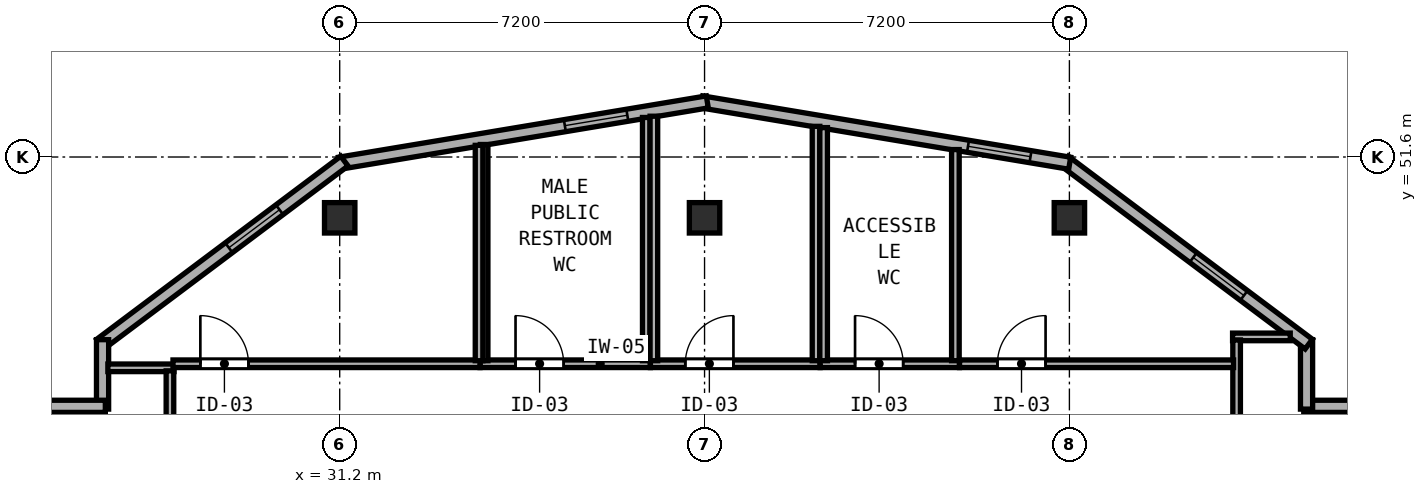
"""IFC4 building model, lengths in metres.
Left out: names, types, materials, properties, quantities, classifications, styles, units other than length and angle.
Written with IfcOpenShell. Run it as: python <this file> out.ifc"""

import sys

from ifc_helpers import new_model, si_unit, direction, frame, frame_2d, origin, origin_2d, place, context, subcontext, project, spatial, rectangle, hollow_rectangle, extrude, element, fill, save


model = new_model("IFC4")
c1 = context("Model", 3, precision=1e-05, world=origin(), true_north=direction((0.0, 1.0)))
c2 = subcontext(c1, "Body", "Model", "MODEL_VIEW")
j1 = project(units=[si_unit("LENGTHUNIT", "METRE"), si_unit("PLANEANGLEUNIT", "RADIAN")], contexts=[c1])
p1 = place(None, origin())
s1 = spatial("IfcSite", under=j1, at=p1, CompositionType="ELEMENT")
p2 = place(p1, origin())
s2 = spatial("IfcBuilding", under=s1, at=p2, CompositionType="ELEMENT")
p3 = place(p2, frame((0.0, 0.0, 313.4)))
s3 = spatial("IfcBuildingStorey", under=s2, at=p3, CompositionType="ELEMENT", Elevation=313.4)
for number, where, z_axis, x_axis in (
    (1, (31.2, 50.4, 0.0), (0.0, 0.0, 1.0), (1.0, 0.0, 0.0)),
    (2, (45.6, 50.4, 0.0), (0.0, 0.0, 1.0), (1.0, 0.0, 0.0)),
    (3, (38.4, 50.4, 0.0), (0.0, 0.0, 1.0), (1.0, 0.0, 0.0)),
):
    element("IfcColumn", number, at=place(p3, frame(where, z_axis=z_axis, x_axis=x_axis)), inside=s3, PredefinedType="COLUMN", context=c2, shape_type="SweptSolid", body=[
        extrude(hollow_rectangle(XDim=0.6, YDim=0.6, WallThickness=0.024, at=origin_2d()), origin(), (0.0, 0.0, 1.0), 4.8),
    ])
p4 = place(p3, frame((51.535, 46.68, 0.0), z_axis=(0.0, 0.0, 1.0), x_axis=(-1.0, 0.0, 0.0)))
e4 = element("IfcWall", 4, at=p4, inside=s3, PredefinedType="SOLIDWALL", context=c2, shape_type="SweptSolid", body=[
    extrude(rectangle(XDim=1.31, YDim=0.24, at=frame_2d((0.655, 0.0))), origin(), (0.0, 0.0, 1.0), 4.56),
])
p5 = place(p3, frame((50.28, 46.625, 0.0), z_axis=(0.0, 0.0, 1.0), x_axis=(0.0, 1.0, 0.0)))
e5 = element("IfcWall", 5, at=p5, inside=s3, PredefinedType="SOLIDWALL", context=c2, shape_type="SweptSolid", body=[
    extrude(rectangle(XDim=1.37, YDim=0.24, at=frame_2d((0.685, 0.0))), origin(), (0.0, 0.0, 1.0), 4.56),
])
p6 = place(p3, frame((50.324, 47.907, 0.0), z_axis=(0.0, 0.0, 1.0), x_axis=(-0.80001459783, 0.599980535734, 0.0)))
e6 = element("IfcWall", 6, at=p6, inside=s3, PredefinedType="SOLIDWALL", context=c2, shape_type="SweptSolid", body=[
    extrude(rectangle(XDim=6.021, YDim=0.24, at=frame_2d((3.01, 0.0))), origin(), (0.0, 0.0, 1.0), 4.56),
])
p7 = place(p6, frame((1.6, 0.0, 0.85)))
e7 = element("IfcOpeningElement", 7, at=p7, cuts=e6, PredefinedType="OPENING", context=c2, shape_type="SweptSolid", body=[
    extrude(rectangle(XDim=1.25, YDim=1.95, at=frame_2d((0.625, 0.975))), frame((0.0, 0.13, 0.0), z_axis=(0.0, -1.0, 0.0), x_axis=(1.0, 0.0, 0.0)), (0.0, 0.0, 1.0), 0.26),
])
p8 = place(p3, frame((45.606, 51.477, 0.0), z_axis=(0.0, 0.0, 1.0), x_axis=(-0.986394820321, 0.164393608283, 0.0)))
e8 = element("IfcWall", 8, at=p8, inside=s3, PredefinedType="SOLIDWALL", context=c2, shape_type="SweptSolid", body=[
    extrude(rectangle(XDim=7.36, YDim=0.24, at=frame_2d((3.68, 0.0))), origin(), (0.0, 0.0, 1.0), 4.56),
])
p9 = place(p8, frame((0.784, 0.0, 0.85)))
e9 = element("IfcOpeningElement", 9, at=p9, cuts=e8, PredefinedType="OPENING", context=c2, shape_type="SweptSolid", body=[
    extrude(rectangle(XDim=1.25, YDim=1.95, at=frame_2d((0.625, 0.975))), frame((0.0, 0.13, 0.0), z_axis=(0.0, -1.0, 0.0), x_axis=(1.0, 0.0, 0.0)), (0.0, 0.0, 1.0), 0.26),
])
p10 = place(p3, frame((38.454, 52.687, 0.0), z_axis=(0.0, 0.0, 1.0), x_axis=(-0.986394820321, -0.164393608283, 0.0)))
e10 = element("IfcWall", 10, at=p10, inside=s3, PredefinedType="SOLIDWALL", context=c2, shape_type="SweptSolid", body=[
    extrude(rectangle(XDim=7.36, YDim=0.24, at=frame_2d((3.68, 0.0))), origin(), (0.0, 0.0, 1.0), 4.56),
])
p11 = place(p10, frame((1.6, 0.0, 0.85)))
e11 = element("IfcOpeningElement", 11, at=p11, cuts=e10, PredefinedType="OPENING", context=c2, shape_type="SweptSolid", body=[
    extrude(rectangle(XDim=1.25, YDim=1.95, at=frame_2d((0.625, 0.975))), frame((0.0, 0.13, 0.0), z_axis=(0.0, -1.0, 0.0), x_axis=(1.0, 0.0, 0.0)), (0.0, 0.0, 1.0), 0.26),
])
p12 = place(p3, frame((31.292, 51.519, 0.0), z_axis=(0.0, 0.0, 1.0), x_axis=(-0.8, -0.6, 0.0)))
e12 = element("IfcWall", 12, at=p12, inside=s3, PredefinedType="SOLIDWALL", context=c2, shape_type="SweptSolid", body=[
    extrude(rectangle(XDim=6.021, YDim=0.24, at=frame_2d((3.01, 0.0))), origin(), (0.0, 0.0, 1.0), 4.56),
])
p13 = place(p12, frame((1.6, 0.0, 0.85)))
e13 = element("IfcOpeningElement", 13, at=p13, cuts=e12, PredefinedType="OPENING", context=c2, shape_type="SweptSolid", body=[
    extrude(rectangle(XDim=1.25, YDim=1.95, at=frame_2d((0.625, 0.975))), frame((0.0, 0.13, 0.0), z_axis=(0.0, -1.0, 0.0), x_axis=(1.0, 0.0, 0.0)), (0.0, 0.0, 1.0), 0.26),
])
p14 = place(p3, frame((26.52, 47.995, 0.0), z_axis=(0.0, 0.0, 1.0), x_axis=(0.0, -1.0, 0.0)))
e14 = element("IfcWall", 14, at=p14, inside=s3, PredefinedType="SOLIDWALL", context=c2, shape_type="SweptSolid", body=[
    extrude(rectangle(XDim=1.37, YDim=0.24, at=frame_2d((0.685, 0.0))), origin(), (0.0, 0.0, 1.0), 4.56),
])
p15 = place(p3, frame((26.575, 46.68, 0.0), z_axis=(0.0, 0.0, 1.0), x_axis=(-1.0, 0.0, 0.0)))
e15 = element("IfcWall", 15, at=p15, inside=s3, PredefinedType="SOLIDWALL", context=c2, shape_type="SweptSolid", body=[
    extrude(rectangle(XDim=1.31, YDim=0.24, at=frame_2d((0.655, 0.0))), origin(), (0.0, 0.0, 1.0), 4.56),
])
p16 = place(p3, frame((33.97, 47.52, 0.0), z_axis=(0.0, 0.0, 1.0), x_axis=(1.0, 0.0, 0.0)))
e16 = element("IfcWall", 16, at=p16, inside=s3, PredefinedType="PARTITIONING", context=c2, shape_type="SweptSolid", body=[
    extrude(rectangle(XDim=3.36, YDim=0.15, at=frame_2d((1.68, 0.0))), origin(), (0.0, 0.0, 1.0), 4.56),
])
p17 = place(p16, frame((0.7, 0.0, 0.0)))
e17 = element("IfcOpeningElement", 17, at=p17, cuts=e16, PredefinedType="OPENING", context=c2, shape_type="SweptSolid", body=[
    extrude(rectangle(XDim=0.95, YDim=2.12, at=frame_2d((0.475, 1.06))), frame((0.0, 0.085, 0.0), z_axis=(0.0, -1.0, 0.0), x_axis=(1.0, 0.0, 0.0)), (0.0, 0.0, 1.0), 0.17),
])
p18 = place(p3, frame((34.05, 47.58, 0.0), z_axis=(0.0, 0.0, 1.0), x_axis=(0.0, 1.0, 0.0)))
e18 = element("IfcWall", 18, at=p18, inside=s3, PredefinedType="PARTITIONING", context=c2, shape_type="SweptSolid", body=[
    extrude(rectangle(XDim=4.267, YDim=0.15, at=frame_2d((2.133, 0.0))), origin(), (0.0, 0.0, 1.0), 4.56),
])
p19 = place(p3, frame((37.25, 47.58, 0.0), z_axis=(0.0, 0.0, 1.0), x_axis=(0.0, 1.0, 0.0)))
e19 = element("IfcWall", 19, at=p19, inside=s3, PredefinedType="PARTITIONING", context=c2, shape_type="SweptSolid", body=[
    extrude(rectangle(XDim=4.8, YDim=0.15, at=frame_2d((2.4, 0.0))), origin(), (0.0, 0.0, 1.0), 4.56),
])
p20 = place(p3, frame((37.332, 47.52, 0.0), z_axis=(0.0, 0.0, 1.0), x_axis=(1.0, 0.0, 0.0)))
e20 = element("IfcWall", 20, at=p20, inside=s3, PredefinedType="PARTITIONING", context=c2, shape_type="SweptSolid", body=[
    extrude(rectangle(XDim=3.348, YDim=0.15, at=frame_2d((1.674, 0.0))), origin(), (0.0, 0.0, 1.0), 4.56),
])
p21 = place(p20, frame((0.688, 0.0, 0.0)))
e21 = element("IfcOpeningElement", 21, at=p21, cuts=e20, PredefinedType="OPENING", context=c2, shape_type="SweptSolid", body=[
    extrude(rectangle(XDim=0.95, YDim=2.12, at=frame_2d((0.475, 1.06))), frame((0.0, 0.085, 0.0), z_axis=(0.0, -1.0, 0.0), x_axis=(1.0, 0.0, 0.0)), (0.0, 0.0, 1.0), 0.17),
])
p22 = place(p3, frame((37.4, 47.58, 0.0), z_axis=(0.0, 0.0, 1.0), x_axis=(0.0, 1.0, 0.0)))
e22 = element("IfcWall", 22, at=p22, inside=s3, PredefinedType="PARTITIONING", context=c2, shape_type="SweptSolid", body=[
    extrude(rectangle(XDim=4.825, YDim=0.15, at=frame_2d((2.413, 0.0))), origin(), (0.0, 0.0, 1.0), 4.56),
])
p23 = place(p3, frame((40.6, 47.58, 0.0), z_axis=(0.0, 0.0, 1.0), x_axis=(0.0, 1.0, 0.0)))
e23 = element("IfcWall", 23, at=p23, inside=s3, PredefinedType="PARTITIONING", context=c2, shape_type="SweptSolid", body=[
    extrude(rectangle(XDim=4.625, YDim=0.15, at=frame_2d((2.312, 0.0))), origin(), (0.0, 0.0, 1.0), 4.56),
])
p24 = place(p3, frame((40.682, 47.52, 0.0), z_axis=(0.0, 0.0, 1.0), x_axis=(1.0, 0.0, 0.0)))
e24 = element("IfcWall", 24, at=p24, inside=s3, PredefinedType="PARTITIONING", context=c2, shape_type="SweptSolid", body=[
    extrude(rectangle(XDim=2.748, YDim=0.15, at=frame_2d((1.374, 0.0))), origin(), (0.0, 0.0, 1.0), 4.56),
])
p25 = place(p24, frame((0.688, 0.0, 0.0)))
e25 = element("IfcOpeningElement", 25, at=p25, cuts=e24, PredefinedType="OPENING", context=c2, shape_type="SweptSolid", body=[
    extrude(rectangle(XDim=0.95, YDim=2.12, at=frame_2d((0.475, 1.06))), frame((0.0, 0.085, 0.0), z_axis=(0.0, -1.0, 0.0), x_axis=(1.0, 0.0, 0.0)), (0.0, 0.0, 1.0), 0.17),
])
p26 = place(p3, frame((40.75, 47.58, 0.0), z_axis=(0.0, 0.0, 1.0), x_axis=(0.0, 1.0, 0.0)))
e26 = element("IfcWall", 26, at=p26, inside=s3, PredefinedType="PARTITIONING", context=c2, shape_type="SweptSolid", body=[
    extrude(rectangle(XDim=4.6, YDim=0.15, at=frame_2d((2.3, 0.0))), origin(), (0.0, 0.0, 1.0), 4.56),
])
p27 = place(p3, frame((43.35, 47.58, 0.0), z_axis=(0.0, 0.0, 1.0), x_axis=(0.0, 1.0, 0.0)))
e27 = element("IfcWall", 27, at=p27, inside=s3, PredefinedType="PARTITIONING", context=c2, shape_type="SweptSolid", body=[
    extrude(rectangle(XDim=4.167, YDim=0.15, at=frame_2d((2.083, 0.0))), origin(), (0.0, 0.0, 1.0), 4.56),
])
p28 = place(p3, frame((26.625, 47.44, 0.0), z_axis=(0.0, 0.0, 1.0), x_axis=(1.0, 0.0, 0.0)))
e28 = element("IfcWall", 28, at=p28, inside=s3, PredefinedType="PARTITIONING", context=c2, shape_type="SweptSolid", body=[
    extrude(rectangle(XDim=1.305, YDim=0.15, at=frame_2d((0.652, 0.0))), origin(), (0.0, 0.0, 1.0), 4.56),
])
p29 = place(p3, frame((27.85, 34.06, 0.0), z_axis=(0.0, 0.0, 1.0), x_axis=(0.0, 1.0, 0.0)))
e29 = element("IfcWall", 29, at=p29, inside=s3, PredefinedType="PARTITIONING", context=c2, shape_type="SweptSolid", body=[
    extrude(rectangle(XDim=13.32, YDim=0.15, at=frame_2d((6.66, 0.0))), origin(), (0.0, 0.0, 1.0), 4.56),
])
p30 = place(p29, frame((5.01, 0.0, 0.0), z_axis=(0.0, 0.0, 1.0), x_axis=(-1.0, 0.0, 0.0)))
e30 = element("IfcOpeningElement", 30, at=p30, cuts=e29, PredefinedType="OPENING", context=c2, shape_type="SweptSolid", body=[
    extrude(rectangle(XDim=0.95, YDim=2.12, at=frame_2d((0.475, 1.06))), frame((0.0, 0.085, 0.0), z_axis=(0.0, -1.0, 0.0), x_axis=(1.0, 0.0, 0.0)), (0.0, 0.0, 1.0), 0.17),
])
p31 = place(p3, frame((48.82, 48.05, 0.0), z_axis=(0.0, 0.0, 1.0), x_axis=(1.0, 0.0, 0.0)))
e31 = element("IfcWall", 31, at=p31, inside=s3, PredefinedType="PARTITIONING", context=c2, shape_type="SweptSolid", body=[
    extrude(rectangle(XDim=1.138, YDim=0.15, at=frame_2d((0.569, 0.0))), origin(), (0.0, 0.0, 1.0), 4.56),
])
p32 = place(p3, frame((48.9, 26.31, 0.0), z_axis=(0.0, 0.0, 1.0), x_axis=(0.0, 1.0, 0.0)))
e32 = element("IfcWall", 32, at=p32, inside=s3, PredefinedType="PARTITIONING", context=c2, shape_type="SweptSolid", body=[
    extrude(rectangle(XDim=21.68, YDim=0.15, at=frame_2d((10.84, 0.0))), origin(), (0.0, 0.0, 1.0), 4.56),
])
p33 = place(p32, frame((5.86, 0.0, 0.0)))
e33 = element("IfcOpeningElement", 33, at=p33, cuts=e32, PredefinedType="OPENING", context=c2, shape_type="SweptSolid", body=[
    extrude(rectangle(XDim=0.95, YDim=2.12, at=frame_2d((0.475, 1.06))), frame((0.0, 0.085, 0.0), z_axis=(0.0, -1.0, 0.0), x_axis=(1.0, 0.0, 0.0)), (0.0, 0.0, 1.0), 0.17),
])
p34 = place(p3, frame((27.91, 47.52, 0.0), z_axis=(0.0, 0.0, 1.0), x_axis=(1.0, 0.0, 0.0)))
e34 = element("IfcWall", 34, at=p34, inside=s3, PredefinedType="PARTITIONING", context=c2, shape_type="SweptSolid", body=[
    extrude(rectangle(XDim=6.058, YDim=0.15, at=frame_2d((3.029, 0.0))), origin(), (0.0, 0.0, 1.0), 4.56),
])
p35 = place(p34, frame((0.54, 0.0, 0.0)))
e35 = element("IfcOpeningElement", 35, at=p35, cuts=e34, PredefinedType="OPENING", context=c2, shape_type="SweptSolid", body=[
    extrude(rectangle(XDim=0.95, YDim=2.12, at=frame_2d((0.475, 1.06))), frame((0.0, 0.085, 0.0), z_axis=(0.0, -1.0, 0.0), x_axis=(1.0, 0.0, 0.0)), (0.0, 0.0, 1.0), 0.17),
])
p36 = place(p3, frame((33.95, 47.58, 0.0), z_axis=(0.0, 0.0, 1.0), x_axis=(0.0, 1.0, 0.0)))
e36 = element("IfcWall", 36, at=p36, inside=s3, PredefinedType="PARTITIONING", context=c2, shape_type="SweptSolid", body=[
    extrude(rectangle(XDim=4.25, YDim=0.15, at=frame_2d((2.125, 0.0))), origin(), (0.0, 0.0, 1.0), 4.56),
])
p37 = place(p3, frame((43.432, 47.52, 0.0), z_axis=(0.0, 0.0, 1.0), x_axis=(1.0, 0.0, 0.0)))
e37 = element("IfcWall", 37, at=p37, inside=s3, PredefinedType="PARTITIONING", context=c2, shape_type="SweptSolid", body=[
    extrude(rectangle(XDim=5.408, YDim=0.15, at=frame_2d((2.704, 0.0))), origin(), (0.0, 0.0, 1.0), 4.56),
])
p38 = place(p37, frame((0.748, 0.0, 0.0)))
e38 = element("IfcOpeningElement", 38, at=p38, cuts=e37, PredefinedType="OPENING", context=c2, shape_type="SweptSolid", body=[
    extrude(rectangle(XDim=0.95, YDim=2.12, at=frame_2d((0.475, 1.06))), frame((0.0, 0.085, 0.0), z_axis=(0.0, -1.0, 0.0), x_axis=(1.0, 0.0, 0.0)), (0.0, 0.0, 1.0), 0.17),
])
p39 = place(p7, origin())
e39 = element("IfcWindow", 39, at=p39, inside=s3, PartitioningType="SINGLE_PANEL", PredefinedType="WINDOW", context=c2, shape_type="SweptSolid", body=[
    extrude(rectangle(XDim=1.25, YDim=1.95, at=frame_2d((0.625, 0.975))), frame((0.0, 0.03, 0.0), z_axis=(0.0, -1.0, 0.0), x_axis=(1.0, 0.0, 0.0)), (0.0, 0.0, 1.0), 0.06),
])
fill(e7, e39)
p40 = place(p9, origin())
e40 = element("IfcWindow", 40, at=p40, inside=s3, PartitioningType="SINGLE_PANEL", PredefinedType="WINDOW", context=c2, shape_type="SweptSolid", body=[
    extrude(rectangle(XDim=1.25, YDim=1.95, at=frame_2d((0.625, 0.975))), frame((0.0, 0.03, 0.0), z_axis=(0.0, -1.0, 0.0), x_axis=(1.0, 0.0, 0.0)), (0.0, 0.0, 1.0), 0.06),
])
fill(e9, e40)
p41 = place(p11, origin())
e41 = element("IfcWindow", 41, at=p41, inside=s3, PartitioningType="SINGLE_PANEL", PredefinedType="WINDOW", context=c2, shape_type="SweptSolid", body=[
    extrude(rectangle(XDim=1.25, YDim=1.95, at=frame_2d((0.625, 0.975))), frame((0.0, 0.03, 0.0), z_axis=(0.0, -1.0, 0.0), x_axis=(1.0, 0.0, 0.0)), (0.0, 0.0, 1.0), 0.06),
])
fill(e11, e41)
p42 = place(p13, origin())
e42 = element("IfcWindow", 42, at=p42, inside=s3, PartitioningType="SINGLE_PANEL", PredefinedType="WINDOW", context=c2, shape_type="SweptSolid", body=[
    extrude(rectangle(XDim=1.25, YDim=1.95, at=frame_2d((0.625, 0.975))), frame((0.0, 0.03, 0.0), z_axis=(0.0, -1.0, 0.0), x_axis=(1.0, 0.0, 0.0)), (0.0, 0.0, 1.0), 0.06),
])
fill(e13, e42)
p43 = place(p17, origin())
e43 = element("IfcDoor", 43, at=p43, inside=s3, OperationType="SINGLE_SWING_LEFT", PredefinedType="DOOR", context=c2, shape_type="SweptSolid", body=[
    extrude(rectangle(XDim=0.95, YDim=2.12, at=frame_2d((0.475, 1.06))), frame((0.0, 0.025, 0.0), z_axis=(0.0, -1.0, 0.0), x_axis=(1.0, 0.0, 0.0)), (0.0, 0.0, 1.0), 0.05),
])
fill(e17, e43)
p44 = place(p21, origin())
e44 = element("IfcDoor", 44, at=p44, inside=s3, OperationType="SINGLE_SWING_RIGHT", PredefinedType="DOOR", context=c2, shape_type="SweptSolid", body=[
    extrude(rectangle(XDim=0.95, YDim=2.12, at=frame_2d((0.475, 1.06))), frame((0.0, 0.025, 0.0), z_axis=(0.0, -1.0, 0.0), x_axis=(1.0, 0.0, 0.0)), (0.0, 0.0, 1.0), 0.05),
])
fill(e21, e44)
p45 = place(p25, origin())
e45 = element("IfcDoor", 45, at=p45, inside=s3, OperationType="SINGLE_SWING_LEFT", PredefinedType="DOOR", context=c2, shape_type="SweptSolid", body=[
    extrude(rectangle(XDim=0.95, YDim=2.12, at=frame_2d((0.475, 1.06))), frame((0.0, 0.025, 0.0), z_axis=(0.0, -1.0, 0.0), x_axis=(1.0, 0.0, 0.0)), (0.0, 0.0, 1.0), 0.05),
])
fill(e25, e45)
p46 = place(p35, origin())
e46 = element("IfcDoor", 46, at=p46, inside=s3, OperationType="SINGLE_SWING_LEFT", PredefinedType="DOOR", context=c2, shape_type="SweptSolid", body=[
    extrude(rectangle(XDim=0.95, YDim=2.12, at=frame_2d((0.475, 1.06))), frame((0.0, 0.025, 0.0), z_axis=(0.0, -1.0, 0.0), x_axis=(1.0, 0.0, 0.0)), (0.0, 0.0, 1.0), 0.05),
])
fill(e35, e46)
p47 = place(p38, origin())
e47 = element("IfcDoor", 47, at=p47, inside=s3, OperationType="SINGLE_SWING_RIGHT", PredefinedType="DOOR", context=c2, shape_type="SweptSolid", body=[
    extrude(rectangle(XDim=0.95, YDim=2.12, at=frame_2d((0.475, 1.06))), frame((0.0, 0.025, 0.0), z_axis=(0.0, -1.0, 0.0), x_axis=(1.0, 0.0, 0.0)), (0.0, 0.0, 1.0), 0.05),
])
fill(e38, e47)
save(model, sys.argv[1])
